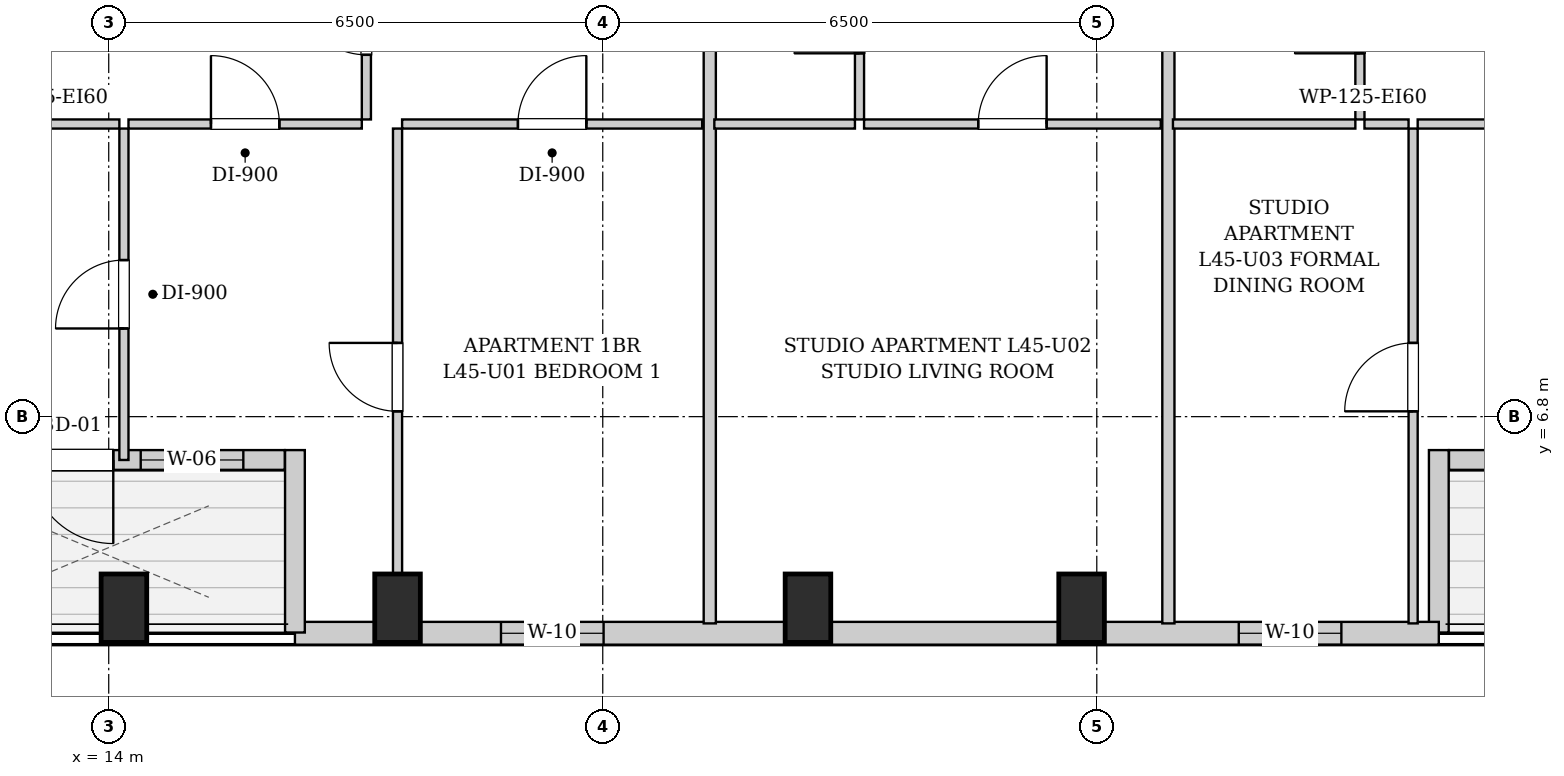
"""IFC4 building model, lengths in metres.
Left out: names, types, materials, properties, quantities, classifications, styles, units other than length and angle.
Written with IfcOpenShell. Run it as: python <this file> out.ifc"""

import sys

from ifc_helpers import new_model, si_unit, direction, frame, frame_2d, origin, origin_2d, place, context, subcontext, project, spatial, rectangle, extrude, element, fill, save


model = new_model("IFC4")
c1 = context("Model", 3, precision=1e-05, world=origin(), true_north=direction((0.0, 1.0)))
c2 = subcontext(c1, "Body", "Model", "MODEL_VIEW")
j1 = project(units=[si_unit("LENGTHUNIT", "METRE"), si_unit("PLANEANGLEUNIT", "RADIAN")], contexts=[c1])
p1 = place(None, origin())
s1 = spatial("IfcSite", under=j1, at=p1, CompositionType="ELEMENT")
p2 = place(p1, origin())
s2 = spatial("IfcBuilding", under=s1, at=p2, CompositionType="ELEMENT")
p3 = place(p2, frame((0.0, 0.0, 156.9)))
s3 = spatial("IfcBuildingStorey", under=s2, at=p3, CompositionType="ELEMENT", Elevation=156.9)
for number, where, z_axis, x_axis in (
    (1, (14.2, 4.28, 0.0), (0.0, 0.0, 1.0), (1.0, 0.0, 0.0)),
    (2, (17.8, 4.28, 0.0), (0.0, 0.0, 1.0), (1.0, 0.0, 0.0)),
    (3, (23.2, 4.28, 0.0), (0.0, 0.0, 1.0), (1.0, 0.0, 0.0)),
    (4, (26.8, 4.28, 0.0), (0.0, 0.0, 1.0), (1.0, 0.0, 0.0)),
):
    element("IfcColumn", number, at=place(p3, frame(where, z_axis=z_axis, x_axis=x_axis)), inside=s3, PredefinedType="COLUMN", context=c2, shape_type="SweptSolid", body=[
        extrude(rectangle(XDim=0.6, YDim=0.9, at=origin_2d()), origin(), (0.0, 0.0, 1.0), 3.25),
    ])
p4 = place(p3, frame((36.366, 6.23, 0.0), z_axis=(0.0, 0.0, 1.0), x_axis=(-1.0, 0.0, 0.0)))
e5 = element("IfcWall", 5, at=p4, inside=s3, PredefinedType="SOLIDWALL", context=c2, shape_type="SweptSolid", body=[
    extrude(rectangle(XDim=4.732, YDim=0.26, at=frame_2d((2.366, 0.0))), origin(), (0.0, 0.0, 1.0), 2.99),
])
p5 = place(p4, frame((1.816, 0.0, 0.0)))
e6 = element("IfcOpeningElement", 6, at=p5, cuts=e5, PredefinedType="OPENING", context=c2, shape_type="SweptSolid", body=[
    extrude(rectangle(XDim=1.1, YDim=2.0, at=frame_2d((0.55, 1.0))), frame((0.0, 0.14, 0.0), z_axis=(0.0, -1.0, 0.0), x_axis=(1.0, 0.0, 0.0)), (0.0, 0.0, 1.0), 0.28),
])
p6 = place(p3, frame((31.5, 6.36, 0.0), z_axis=(0.0, 0.0, 1.0), x_axis=(0.0, -1.0, 0.0)))
e7 = element("IfcWall", 7, at=p6, inside=s3, PredefinedType="SOLIDWALL", context=c2, shape_type="SweptSolid", body=[
    extrude(rectangle(XDim=2.4, YDim=0.26, at=frame_2d((1.2, 0.0))), origin(), (0.0, 0.0, 1.0), 2.99),
])
p7 = place(p3, frame((31.5, 3.95, 0.0), z_axis=(0.0, 0.0, 1.0), x_axis=(-1.0, 0.0, 0.0)))
e8 = element("IfcWall", 8, at=p7, inside=s3, PredefinedType="SOLIDWALL", context=c2, shape_type="SweptSolid", body=[
    extrude(rectangle(XDim=15.05, YDim=0.3, at=frame_2d((7.525, 0.0))), origin(), (0.0, 0.0, 1.0), 2.99),
])
p8 = place(p7, frame((10.989, 0.0, 0.55)))
e9 = element("IfcOpeningElement", 9, at=p8, cuts=e8, PredefinedType="OPENING", context=c2, shape_type="SweptSolid", body=[
    extrude(rectangle(XDim=1.35, YDim=1.2, at=frame_2d((0.675, 0.6))), frame((0.0, 0.16, 0.0), z_axis=(0.0, -1.0, 0.0), x_axis=(1.0, 0.0, 0.0)), (0.0, 0.0, 1.0), 0.32),
])
p9 = place(p7, frame((1.282, 0.0, 0.55)))
e10 = element("IfcOpeningElement", 10, at=p9, cuts=e8, PredefinedType="OPENING", context=c2, shape_type="SweptSolid", body=[
    extrude(rectangle(XDim=1.35, YDim=1.2, at=frame_2d((0.675, 0.6))), frame((0.0, 0.16, 0.0), z_axis=(0.0, -1.0, 0.0), x_axis=(1.0, 0.0, 0.0)), (0.0, 0.0, 1.0), 0.32),
])
p10 = place(p3, frame((16.45, 3.96, 0.0), z_axis=(0.0, 0.0, 1.0), x_axis=(0.0, 1.0, 0.0)))
e11 = element("IfcWall", 11, at=p10, inside=s3, PredefinedType="SOLIDWALL", context=c2, shape_type="SweptSolid", body=[
    extrude(rectangle(XDim=2.4, YDim=0.26, at=frame_2d((1.2, 0.0))), origin(), (0.0, 0.0, 1.0), 2.99),
])
p11 = place(p3, frame((16.316, 6.23, 0.0), z_axis=(0.0, 0.0, 1.0), x_axis=(-1.0, 0.0, 0.0)))
e12 = element("IfcWall", 12, at=p11, inside=s3, PredefinedType="SOLIDWALL", context=c2, shape_type="SweptSolid", body=[
    extrude(rectangle(XDim=4.882, YDim=0.26, at=frame_2d((2.441, 0.0))), origin(), (0.0, 0.0, 1.0), 2.99),
])
p12 = place(p11, frame((2.256, 0.0, 0.0)))
e13 = element("IfcOpeningElement", 13, at=p12, cuts=e12, PredefinedType="OPENING", context=c2, shape_type="SweptSolid", body=[
    extrude(rectangle(XDim=1.1, YDim=2.0, at=frame_2d((0.55, 1.0))), frame((0.0, 0.14, 0.0), z_axis=(0.0, -1.0, 0.0), x_axis=(1.0, 0.0, 0.0)), (0.0, 0.0, 1.0), 0.28),
])
p13 = place(p11, frame((3.516, 0.0, 0.55)))
e14 = element("IfcOpeningElement", 14, at=p13, cuts=e12, PredefinedType="OPENING", context=c2, shape_type="SweptSolid", body=[
    extrude(rectangle(XDim=0.85, YDim=1.2, at=frame_2d((0.425, 0.6))), frame((0.0, 0.14, 0.0), z_axis=(0.0, -1.0, 0.0), x_axis=(1.0, 0.0, 0.0)), (0.0, 0.0, 1.0), 0.28),
])
p14 = place(p11, frame((0.545, 0.0, 0.85)))
e15 = element("IfcOpeningElement", 15, at=p14, cuts=e12, PredefinedType="OPENING", context=c2, shape_type="SweptSolid", body=[
    extrude(rectangle(XDim=1.35, YDim=1.65, at=frame_2d((0.675, 0.825))), frame((0.0, 0.14, 0.0), z_axis=(0.0, -1.0, 0.0), x_axis=(1.0, 0.0, 0.0)), (0.0, 0.0, 1.0), 0.28),
])
p15 = place(p3, frame((17.39, 10.71, 0.0), z_axis=(0.0, 0.0, 1.0), x_axis=(0.0, 1.0, 0.0)))
e16 = element("IfcWall", 16, at=p15, inside=s3, PredefinedType="PARTITIONING", context=c2, shape_type="SweptSolid", body=[
    extrude(rectangle(XDim=2.6, YDim=0.12, at=frame_2d((1.3, 0.0))), origin(), (0.0, 0.0, 1.0), 2.99),
])
p16 = place(p15, frame((0.85, 0.0, 0.0)))
e17 = element("IfcOpeningElement", 17, at=p16, cuts=e16, PredefinedType="OPENING", context=c2, shape_type="SweptSolid", body=[
    extrude(rectangle(XDim=0.9, YDim=2.05, at=frame_2d((0.45, 1.025))), frame((0.0, 0.07, 0.0), z_axis=(0.0, -1.0, 0.0), x_axis=(1.0, 0.0, 0.0)), (0.0, 0.0, 1.0), 0.14),
])
p17 = place(p3, frame((13.15, 10.65, 0.0), z_axis=(0.0, 0.0, 1.0), x_axis=(1.0, 0.0, 0.0)))
e18 = element("IfcWall", 18, at=p17, inside=s3, PredefinedType="PARTITIONING", context=c2, shape_type="SweptSolid", body=[
    extrude(rectangle(XDim=0.99, YDim=0.12, at=frame_2d((0.495, 0.0))), origin(), (0.0, 0.0, 1.0), 2.99),
])
p18 = place(p3, frame((14.26, 10.65, 0.0), z_axis=(0.0, 0.0, 1.0), x_axis=(1.0, 0.0, 0.0)))
e19 = element("IfcWall", 19, at=p18, inside=s3, PredefinedType="PARTITIONING", context=c2, shape_type="SweptSolid", body=[
    extrude(rectangle(XDim=3.07, YDim=0.12, at=frame_2d((1.535, 0.0))), origin(), (0.0, 0.0, 1.0), 2.99),
])
p19 = place(p18, frame((1.085, 0.0, 0.0)))
e20 = element("IfcOpeningElement", 20, at=p19, cuts=e19, PredefinedType="OPENING", context=c2, shape_type="SweptSolid", body=[
    extrude(rectangle(XDim=0.9, YDim=2.05, at=frame_2d((0.45, 1.025))), frame((0.0, 0.07, 0.0), z_axis=(0.0, -1.0, 0.0), x_axis=(1.0, 0.0, 0.0)), (0.0, 0.0, 1.0), 0.14),
])
p20 = place(p3, frame((17.86, 10.65, 0.0), z_axis=(0.0, 0.0, 1.0), x_axis=(1.0, 0.0, 0.0)))
e21 = element("IfcWall", 21, at=p20, inside=s3, PredefinedType="PARTITIONING", context=c2, shape_type="SweptSolid", body=[
    extrude(rectangle(XDim=3.948, YDim=0.12, at=frame_2d((1.974, 0.0))), origin(), (0.0, 0.0, 1.0), 2.99),
])
p21 = place(p20, frame((1.524, 0.0, 0.0)))
e22 = element("IfcOpeningElement", 22, at=p21, cuts=e21, PredefinedType="OPENING", context=c2, shape_type="SweptSolid", body=[
    extrude(rectangle(XDim=0.9, YDim=2.05, at=frame_2d((0.45, 1.025))), frame((0.0, 0.07, 0.0), z_axis=(0.0, -1.0, 0.0), x_axis=(1.0, 0.0, 0.0)), (0.0, 0.0, 1.0), 0.14),
])
p22 = place(p3, frame((14.2, 6.23, 0.0), z_axis=(0.0, 0.0, 1.0), x_axis=(0.0, 1.0, 0.0)))
e23 = element("IfcWall", 23, at=p22, inside=s3, PredefinedType="PARTITIONING", context=c2, shape_type="SweptSolid", body=[
    extrude(rectangle(XDim=4.36, YDim=0.12, at=frame_2d((2.18, 0.0))), origin(), (0.0, 0.0, 1.0), 2.99),
])
p23 = place(p22, frame((1.73, 0.0, 0.0)))
e24 = element("IfcOpeningElement", 24, at=p23, cuts=e23, PredefinedType="OPENING", context=c2, shape_type="SweptSolid", body=[
    extrude(rectangle(XDim=0.9, YDim=2.05, at=frame_2d((0.45, 1.025))), frame((0.0, 0.07, 0.0), z_axis=(0.0, -1.0, 0.0), x_axis=(1.0, 0.0, 0.0)), (0.0, 0.0, 1.0), 0.14),
])
p24 = place(p3, frame((17.8, 4.08, 0.0), z_axis=(0.0, 0.0, 1.0), x_axis=(0.0, 1.0, 0.0)))
e25 = element("IfcWall", 25, at=p24, inside=s3, PredefinedType="PARTITIONING", context=c2, shape_type="SweptSolid", body=[
    extrude(rectangle(XDim=6.51, YDim=0.12, at=frame_2d((3.255, 0.0))), origin(), (0.0, 0.0, 1.0), 2.442),
])
p25 = place(p24, frame((2.79, 0.0, 0.0)))
e26 = element("IfcOpeningElement", 26, at=p25, cuts=e25, PredefinedType="OPENING", context=c2, shape_type="SweptSolid", body=[
    extrude(rectangle(XDim=0.9, YDim=2.05, at=frame_2d((0.45, 1.025))), frame((0.0, 0.07, 0.0), z_axis=(0.0, -1.0, 0.0), x_axis=(1.0, 0.0, 0.0)), (0.0, 0.0, 1.0), 0.14),
])
p26 = place(p3, frame((21.908, 4.08, 0.0), z_axis=(0.0, 0.0, 1.0), x_axis=(0.0, 1.0, 0.0)))
e27 = element("IfcWall", 27, at=p26, inside=s3, PredefinedType="PARTITIONING", context=c2, shape_type="SweptSolid", body=[
    extrude(rectangle(XDim=9.23, YDim=0.16, at=frame_2d((4.615, 0.0))), origin(), (0.0, 0.0, 1.0), 2.99),
])
p27 = place(p3, frame((23.878, 10.71, 0.0), z_axis=(0.0, 0.0, 1.0), x_axis=(0.0, 1.0, 0.0)))
e28 = element("IfcWall", 28, at=p27, inside=s3, PredefinedType="PARTITIONING", context=c2, shape_type="SweptSolid", body=[
    extrude(rectangle(XDim=2.6, YDim=0.12, at=frame_2d((1.3, 0.0))), origin(), (0.0, 0.0, 1.0), 2.99),
])
p28 = place(p27, frame((0.87, 0.0, 0.0)))
e29 = element("IfcOpeningElement", 29, at=p28, cuts=e28, PredefinedType="OPENING", context=c2, shape_type="SweptSolid", body=[
    extrude(rectangle(XDim=0.86, YDim=2.05, at=frame_2d((0.43, 1.025))), frame((0.0, 0.07, 0.0), z_axis=(0.0, -1.0, 0.0), x_axis=(1.0, 0.0, 0.0)), (0.0, 0.0, 1.0), 0.14),
])
p29 = place(p3, frame((21.968, 10.65, 0.0), z_axis=(0.0, 0.0, 1.0), x_axis=(1.0, 0.0, 0.0)))
e30 = element("IfcWall", 30, at=p29, inside=s3, PredefinedType="PARTITIONING", context=c2, shape_type="SweptSolid", body=[
    extrude(rectangle(XDim=1.85, YDim=0.12, at=frame_2d((0.925, 0.0))), origin(), (0.0, 0.0, 1.0), 2.99),
])
p30 = place(p3, frame((23.938, 10.65, 0.0), z_axis=(0.0, 0.0, 1.0), x_axis=(1.0, 0.0, 0.0)))
e31 = element("IfcWall", 31, at=p30, inside=s3, PredefinedType="PARTITIONING", context=c2, shape_type="SweptSolid", body=[
    extrude(rectangle(XDim=3.904, YDim=0.12, at=frame_2d((1.952, 0.0))), origin(), (0.0, 0.0, 1.0), 2.99),
])
p31 = place(p30, frame((1.502, 0.0, 0.0)))
e32 = element("IfcOpeningElement", 32, at=p31, cuts=e31, PredefinedType="OPENING", context=c2, shape_type="SweptSolid", body=[
    extrude(rectangle(XDim=0.9, YDim=2.05, at=frame_2d((0.45, 1.025))), frame((0.0, 0.07, 0.0), z_axis=(0.0, -1.0, 0.0), x_axis=(1.0, 0.0, 0.0)), (0.0, 0.0, 1.0), 0.14),
])
p32 = place(p3, frame((27.942, 4.08, 0.0), z_axis=(0.0, 0.0, 1.0), x_axis=(0.0, 1.0, 0.0)))
e33 = element("IfcWall", 33, at=p32, inside=s3, PredefinedType="PARTITIONING", context=c2, shape_type="SweptSolid", body=[
    extrude(rectangle(XDim=9.23, YDim=0.16, at=frame_2d((4.615, 0.0))), origin(), (0.0, 0.0, 1.0), 2.99),
])
p33 = place(p3, frame((30.462, 10.71, 0.0), z_axis=(0.0, 0.0, 1.0), x_axis=(0.0, 1.0, 0.0)))
e34 = element("IfcWall", 34, at=p33, inside=s3, PredefinedType="PARTITIONING", context=c2, shape_type="SweptSolid", body=[
    extrude(rectangle(XDim=2.6, YDim=0.12, at=frame_2d((1.3, 0.0))), origin(), (0.0, 0.0, 1.0), 2.99),
])
p34 = place(p33, frame((0.87, 0.0, 0.0)))
e35 = element("IfcOpeningElement", 35, at=p34, cuts=e34, PredefinedType="OPENING", context=c2, shape_type="SweptSolid", body=[
    extrude(rectangle(XDim=0.86, YDim=2.05, at=frame_2d((0.43, 1.025))), frame((0.0, 0.07, 0.0), z_axis=(0.0, -1.0, 0.0), x_axis=(1.0, 0.0, 0.0)), (0.0, 0.0, 1.0), 0.14),
])
p35 = place(p3, frame((28.002, 10.65, 0.0), z_axis=(0.0, 0.0, 1.0), x_axis=(1.0, 0.0, 0.0)))
e36 = element("IfcWall", 36, at=p35, inside=s3, PredefinedType="PARTITIONING", context=c2, shape_type="SweptSolid", body=[
    extrude(rectangle(XDim=2.4, YDim=0.12, at=frame_2d((1.2, 0.0))), origin(), (0.0, 0.0, 1.0), 2.99),
])
p36 = place(p3, frame((30.522, 10.65, 0.0), z_axis=(0.0, 0.0, 1.0), x_axis=(1.0, 0.0, 0.0)))
e37 = element("IfcWall", 37, at=p36, inside=s3, PredefinedType="PARTITIONING", context=c2, shape_type="SweptSolid", body=[
    extrude(rectangle(XDim=0.58, YDim=0.12, at=frame_2d((0.29, 0.0))), origin(), (0.0, 0.0, 1.0), 2.99),
])
p37 = place(p3, frame((31.222, 10.65, 0.0), z_axis=(0.0, 0.0, 1.0), x_axis=(1.0, 0.0, 0.0)))
e38 = element("IfcWall", 38, at=p37, inside=s3, PredefinedType="PARTITIONING", context=c2, shape_type="SweptSolid", body=[
    extrude(rectangle(XDim=3.148, YDim=0.12, at=frame_2d((1.574, 0.0))), origin(), (0.0, 0.0, 1.0), 2.99),
])
p38 = place(p37, frame((1.124, 0.0, 0.0)))
e39 = element("IfcOpeningElement", 39, at=p38, cuts=e38, PredefinedType="OPENING", context=c2, shape_type="SweptSolid", body=[
    extrude(rectangle(XDim=0.9, YDim=2.05, at=frame_2d((0.45, 1.025))), frame((0.0, 0.07, 0.0), z_axis=(0.0, -1.0, 0.0), x_axis=(1.0, 0.0, 0.0)), (0.0, 0.0, 1.0), 0.14),
])
p39 = place(p3, frame((31.162, 4.08, 0.0), z_axis=(0.0, 0.0, 1.0), x_axis=(0.0, 1.0, 0.0)))
e40 = element("IfcWall", 40, at=p39, inside=s3, PredefinedType="PARTITIONING", context=c2, shape_type="SweptSolid", body=[
    extrude(rectangle(XDim=6.51, YDim=0.12, at=frame_2d((3.255, 0.0))), origin(), (0.0, 0.0, 1.0), 2.99),
])
p40 = place(p39, frame((2.79, 0.0, 0.0)))
e41 = element("IfcOpeningElement", 41, at=p40, cuts=e40, PredefinedType="OPENING", context=c2, shape_type="SweptSolid", body=[
    extrude(rectangle(XDim=0.9, YDim=2.05, at=frame_2d((0.45, 1.025))), frame((0.0, 0.07, 0.0), z_axis=(0.0, -1.0, 0.0), x_axis=(1.0, 0.0, 0.0)), (0.0, 0.0, 1.0), 0.14),
])
p41 = place(p16, origin())
e42 = element("IfcDoor", 42, at=p41, inside=s3, OperationType="SINGLE_SWING_RIGHT", PredefinedType="DOOR", context=c2, shape_type="SweptSolid", body=[
    extrude(rectangle(XDim=0.9, YDim=2.05, at=frame_2d((0.45, 1.025))), frame((0.0, 0.025, 0.0), z_axis=(0.0, -1.0, 0.0), x_axis=(1.0, 0.0, 0.0)), (0.0, 0.0, 1.0), 0.05),
])
fill(e17, e42)
p42 = place(p19, origin())
e43 = element("IfcDoor", 43, at=p42, inside=s3, OperationType="SINGLE_SWING_LEFT", PredefinedType="DOOR", context=c2, shape_type="SweptSolid", body=[
    extrude(rectangle(XDim=0.9, YDim=2.05, at=frame_2d((0.45, 1.025))), frame((0.0, 0.025, 0.0), z_axis=(0.0, -1.0, 0.0), x_axis=(1.0, 0.0, 0.0)), (0.0, 0.0, 1.0), 0.05),
])
fill(e20, e43)
p43 = place(p21, origin())
e44 = element("IfcDoor", 44, at=p43, inside=s3, OperationType="SINGLE_SWING_RIGHT", PredefinedType="DOOR", context=c2, shape_type="SweptSolid", body=[
    extrude(rectangle(XDim=0.9, YDim=2.05, at=frame_2d((0.45, 1.025))), frame((0.0, 0.025, 0.0), z_axis=(0.0, -1.0, 0.0), x_axis=(1.0, 0.0, 0.0)), (0.0, 0.0, 1.0), 0.05),
])
fill(e22, e44)
p44 = place(p23, origin())
e45 = element("IfcDoor", 45, at=p44, inside=s3, OperationType="SINGLE_SWING_LEFT", PredefinedType="DOOR", context=c2, shape_type="SweptSolid", body=[
    extrude(rectangle(XDim=0.9, YDim=2.05, at=frame_2d((0.45, 1.025))), frame((0.0, 0.025, 0.0), z_axis=(0.0, -1.0, 0.0), x_axis=(1.0, 0.0, 0.0)), (0.0, 0.0, 1.0), 0.05),
])
fill(e24, e45)
p45 = place(p25, origin())
e46 = element("IfcDoor", 46, at=p45, inside=s3, OperationType="SINGLE_SWING_RIGHT", PredefinedType="DOOR", context=c2, shape_type="SweptSolid", body=[
    extrude(rectangle(XDim=0.9, YDim=2.05, at=frame_2d((0.45, 1.025))), frame((0.0, 0.025, 0.0), z_axis=(0.0, -1.0, 0.0), x_axis=(1.0, 0.0, 0.0)), (0.0, 0.0, 1.0), 0.05),
])
fill(e26, e46)
p46 = place(p28, origin())
e47 = element("IfcDoor", 47, at=p46, inside=s3, OperationType="SINGLE_SWING_LEFT", PredefinedType="DOOR", context=c2, shape_type="SweptSolid", body=[
    extrude(rectangle(XDim=0.86, YDim=2.05, at=frame_2d((0.43, 1.025))), frame((0.0, 0.025, 0.0), z_axis=(0.0, -1.0, 0.0), x_axis=(1.0, 0.0, 0.0)), (0.0, 0.0, 1.0), 0.05),
])
fill(e29, e47)
p47 = place(p31, origin())
e48 = element("IfcDoor", 48, at=p47, inside=s3, OperationType="SINGLE_SWING_RIGHT", PredefinedType="DOOR", context=c2, shape_type="SweptSolid", body=[
    extrude(rectangle(XDim=0.9, YDim=2.05, at=frame_2d((0.45, 1.025))), frame((0.0, 0.025, 0.0), z_axis=(0.0, -1.0, 0.0), x_axis=(1.0, 0.0, 0.0)), (0.0, 0.0, 1.0), 0.05),
])
fill(e32, e48)
p48 = place(p34, origin())
e49 = element("IfcDoor", 49, at=p48, inside=s3, OperationType="SINGLE_SWING_LEFT", PredefinedType="DOOR", context=c2, shape_type="SweptSolid", body=[
    extrude(rectangle(XDim=0.86, YDim=2.05, at=frame_2d((0.43, 1.025))), frame((0.0, 0.025, 0.0), z_axis=(0.0, -1.0, 0.0), x_axis=(1.0, 0.0, 0.0)), (0.0, 0.0, 1.0), 0.05),
])
fill(e35, e49)
p49 = place(p40, origin())
e50 = element("IfcDoor", 50, at=p49, inside=s3, OperationType="SINGLE_SWING_LEFT", PredefinedType="DOOR", context=c2, shape_type="SweptSolid", body=[
    extrude(rectangle(XDim=0.9, YDim=2.05, at=frame_2d((0.45, 1.025))), frame((0.0, 0.025, 0.0), z_axis=(0.0, -1.0, 0.0), x_axis=(1.0, 0.0, 0.0)), (0.0, 0.0, 1.0), 0.05),
])
fill(e41, e50)
p50 = place(p12, origin())
e51 = element("IfcDoor", 51, at=p50, inside=s3, OperationType="SINGLE_SWING_LEFT", PredefinedType="DOOR", context=c2, shape_type="SweptSolid", body=[
    extrude(rectangle(XDim=1.1, YDim=2.0, at=frame_2d((0.55, 1.0))), frame((0.0, 0.025, 0.0), z_axis=(0.0, -1.0, 0.0), x_axis=(1.0, 0.0, 0.0)), (0.0, 0.0, 1.0), 0.05),
])
fill(e13, e51)
p51 = place(p14, origin())
e52 = element("IfcWindow", 52, at=p51, inside=s3, PartitioningType="SINGLE_PANEL", PredefinedType="WINDOW", context=c2, shape_type="SweptSolid", body=[
    extrude(rectangle(XDim=1.35, YDim=1.65, at=frame_2d((0.675, 0.825))), frame((0.0, 0.03, 0.0), z_axis=(0.0, -1.0, 0.0), x_axis=(1.0, 0.0, 0.0)), (0.0, 0.0, 1.0), 0.06),
])
fill(e15, e52)
p52 = place(p8, origin())
e53 = element("IfcWindow", 53, at=p52, inside=s3, PartitioningType="SINGLE_PANEL", PredefinedType="WINDOW", context=c2, shape_type="SweptSolid", body=[
    extrude(rectangle(XDim=1.35, YDim=1.2, at=frame_2d((0.675, 0.6))), frame((0.0, 0.03, 0.0), z_axis=(0.0, -1.0, 0.0), x_axis=(1.0, 0.0, 0.0)), (0.0, 0.0, 1.0), 0.06),
])
fill(e9, e53)
p53 = place(p9, origin())
e54 = element("IfcWindow", 54, at=p53, inside=s3, PartitioningType="SINGLE_PANEL", PredefinedType="WINDOW", context=c2, shape_type="SweptSolid", body=[
    extrude(rectangle(XDim=1.35, YDim=1.2, at=frame_2d((0.675, 0.6))), frame((0.0, 0.03, 0.0), z_axis=(0.0, -1.0, 0.0), x_axis=(1.0, 0.0, 0.0)), (0.0, 0.0, 1.0), 0.06),
])
fill(e10, e54)
save(model, sys.argv[1])
